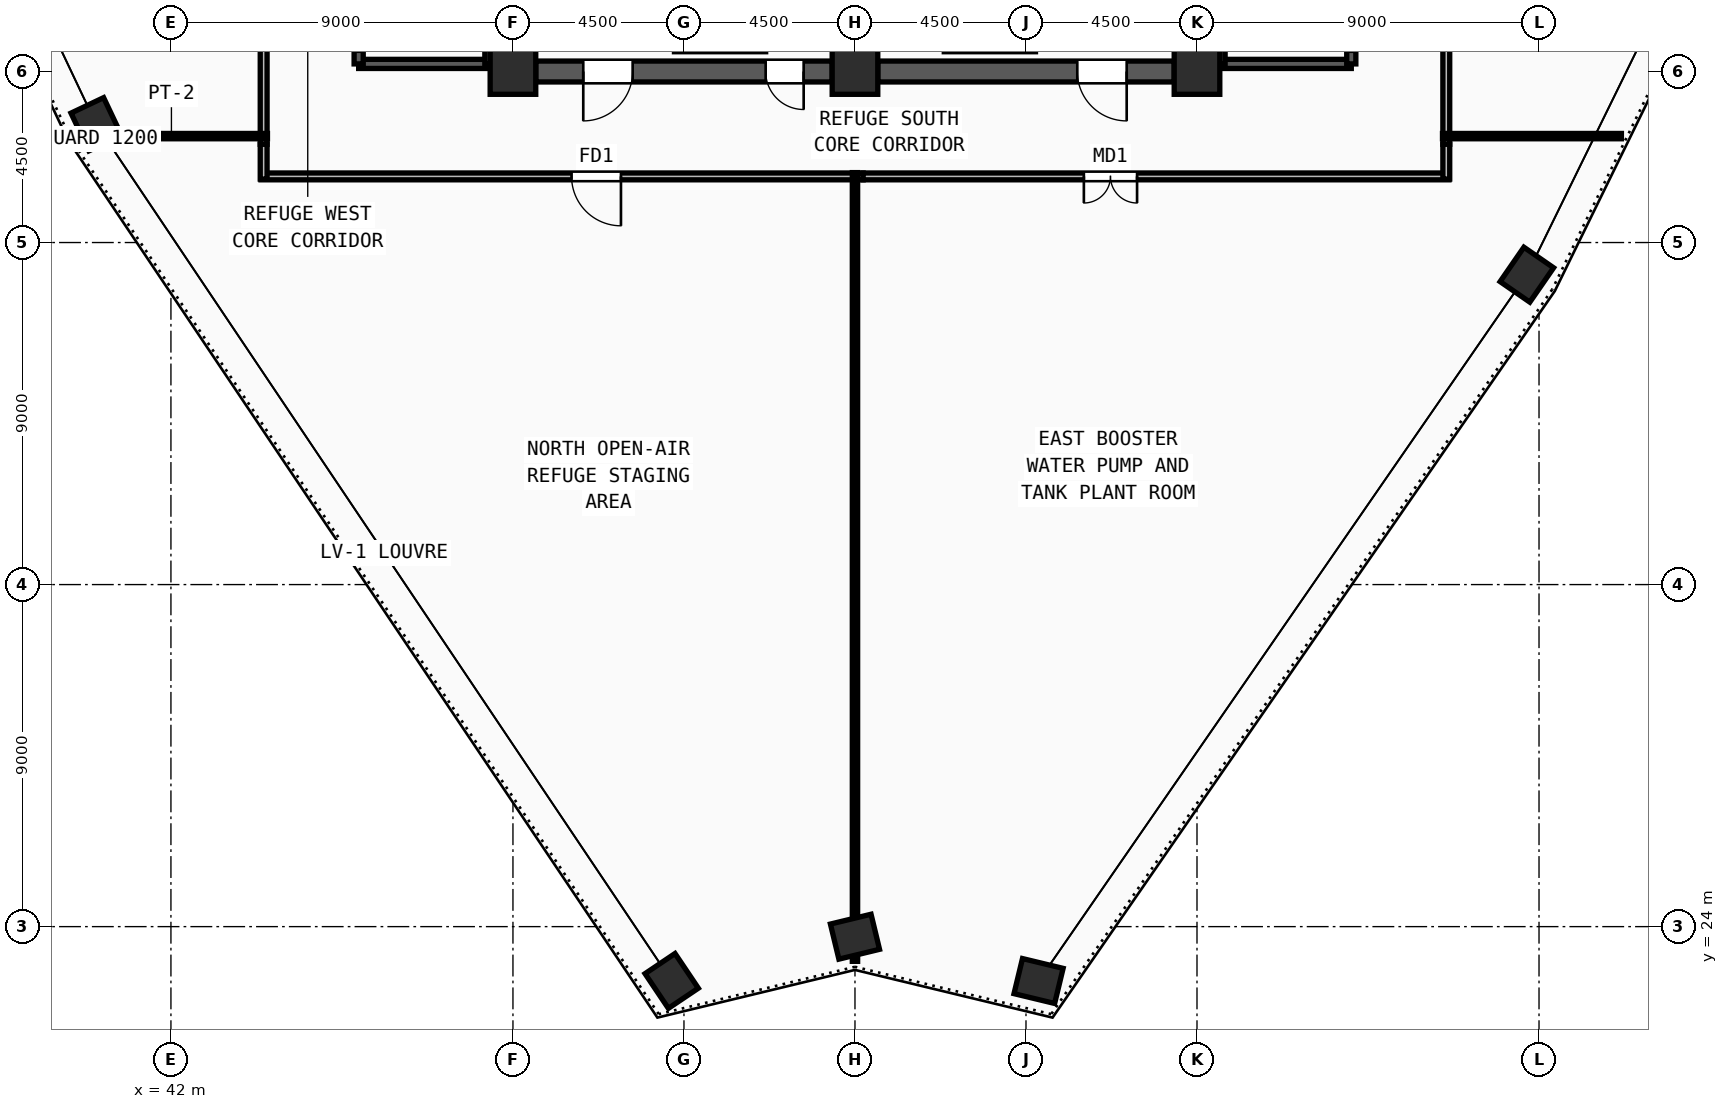
"""IFC4 building model, lengths in metres.
Left out: names, types, materials, properties, quantities, classifications, styles, units other than length and angle.
Written with IfcOpenShell. Run it as: python <this file> out.ifc"""

import sys

from ifc_helpers import new_model, si_unit, direction, frame, frame_2d, origin, origin_2d, place, context, subcontext, project, spatial, rectangle, extrude, source, transform, mapped, element, fill, save


model = new_model("IFC4")
c1 = context("Model", 3, precision=1e-05, world=origin(), true_north=direction((0.0, 1.0)))
c2 = subcontext(c1, "Body", "Model", "MODEL_VIEW")
j1 = project(units=[si_unit("LENGTHUNIT", "METRE"), si_unit("PLANEANGLEUNIT", "RADIAN")], contexts=[c1])
p1 = place(None, origin())
s1 = spatial("IfcSite", under=j1, at=p1, CompositionType="ELEMENT")
p2 = place(p1, origin())
s2 = spatial("IfcBuilding", under=s1, at=p2, CompositionType="ELEMENT")
p3 = place(p2, frame((0.0, 0.0, 324.0)))
s3 = spatial("IfcBuildingStorey", under=s2, at=p3, CompositionType="ELEMENT", Elevation=324.0)
m1 = source(origin(), c2, "Body", "SweptSolid", [
    extrude(rectangle(XDim=1.2, YDim=1.2, at=origin_2d()), origin(), (0.0, 0.0, 1.0), 4.5),
])
for number, where, z_axis, x_axis in (
    (1, (51.0, 46.5, 0.0), (0.0, 0.0, 1.0), (1.0, 0.0, 0.0)),
    (2, (60.0, 46.5, 0.0), (0.0, 0.0, 1.0), (1.0, 0.0, 0.0)),
    (3, (69.0, 46.5, 0.0), (0.0, 0.0, 1.0), (1.0, 0.0, 0.0)),
):
    element("IfcColumn", number, at=place(p3, frame(where, z_axis=z_axis, x_axis=x_axis)), inside=s3, PredefinedType="COLUMN", context=c2, shape_type="MappedRepresentation", body=[
        mapped(m1, transform((0.0, 0.0, 0.0), x_axis=(1.0, 0.0, 0.0), y_axis=(0.0, 1.0, 0.0), z_axis=(0.0, 0.0, 1.0), scale=1.0)),
    ])
m2 = source(origin(), c2, "Body", "SweptSolid", [
    extrude(rectangle(XDim=1.1, YDim=0.95, at=origin_2d()), origin(), (0.0, 0.0, 1.0), 4.5),
])
for number, where, z_axis, x_axis in (
    (4, (55.177, 22.571, 0.0), (0.0, 0.0, 1.0), (-0.558, 0.83, 0.0)),
    (5, (40.035, 45.112, 0.0), (0.0, 0.0, 1.0), (-0.428, 0.904, 0.0)),
    (6, (77.68, 41.154, 0.0), (0.0, 0.0, 1.0), (0.569, 0.823, 0.0)),
    (7, (64.831, 22.569, 0.0), (0.0, 0.0, 1.0), (-0.972, 0.235, 0.0)),
    (8, (60.0, 23.735, 0.0), (0.0, 0.0, 1.0), (0.972, 0.235, 0.0)),
):
    element("IfcColumn", number, at=place(p3, frame(where, z_axis=z_axis, x_axis=x_axis)), inside=s3, PredefinedType="COLUMN", context=c2, shape_type="MappedRepresentation", body=[
        mapped(m2, transform((0.0, 0.0, 0.0), x_axis=(1.0, 0.0, 0.0), y_axis=(0.0, 1.0, 0.0), z_axis=(0.0, 0.0, 1.0), scale=1.0)),
    ])
p4 = place(p3, frame((68.4, 46.5, 0.0), z_axis=(0.0, 0.0, 1.0), x_axis=(-1.0, 0.0, 0.0)))
e9 = element("IfcWall", 9, at=p4, inside=s3, PredefinedType="SHEAR", context=c2, shape_type="SweptSolid", body=[
    extrude(rectangle(XDim=7.8, YDim=0.55, at=frame_2d((3.9, 0.0))), origin(), (0.0, 0.0, 1.0), 4.32),
])
m3 = source(origin(), c2, "Body", "SweptSolid", [
    extrude(rectangle(XDim=1.3, YDim=2.2, at=frame_2d((0.65, 1.1))), frame((0.0, 0.285, 0.0), z_axis=(0.0, -1.0, 0.0), x_axis=(1.0, 0.0, 0.0)), (0.0, 0.0, 1.0), 0.57),
])
p5 = place(p4, frame((1.25, 0.0, 0.0)))
e10 = element("IfcOpeningElement", 10, at=p5, cuts=e9, PredefinedType="OPENING", context=c2, shape_type="MappedRepresentation", body=[
    mapped(m3, transform((0.0, 0.0, 0.0), x_axis=(1.0, 0.0, 0.0), y_axis=(0.0, 1.0, 0.0), z_axis=(0.0, 0.0, 1.0), scale=1.0)),
])
p6 = place(p3, frame((59.4, 46.5, 0.0), z_axis=(0.0, 0.0, 1.0), x_axis=(-1.0, 0.0, 0.0)))
e11 = element("IfcWall", 11, at=p6, inside=s3, PredefinedType="SHEAR", context=c2, shape_type="SweptSolid", body=[
    extrude(rectangle(XDim=7.8, YDim=0.55, at=frame_2d((3.9, 0.0))), origin(), (0.0, 0.0, 1.0), 4.32),
])
p7 = place(p6, frame((5.25, 0.0, 0.0)))
e12 = element("IfcOpeningElement", 12, at=p7, cuts=e11, PredefinedType="OPENING", context=c2, shape_type="MappedRepresentation", body=[
    mapped(m3, transform((0.0, 0.0, 0.0), x_axis=(1.0, 0.0, 0.0), y_axis=(0.0, 1.0, 0.0), z_axis=(0.0, 0.0, 1.0), scale=1.0)),
])
m4 = source(origin(), c2, "Body", "SweptSolid", [
    extrude(rectangle(XDim=1.0, YDim=2.2, at=frame_2d((0.5, 1.1))), frame((0.0, 0.285, 0.0), z_axis=(0.0, -1.0, 0.0), x_axis=(1.0, 0.0, 0.0)), (0.0, 0.0, 1.0), 0.57),
])
p8 = place(p6, frame((0.75, 0.0, 0.0)))
e13 = element("IfcOpeningElement", 13, at=p8, cuts=e11, PredefinedType="OPENING", context=c2, shape_type="MappedRepresentation", body=[
    mapped(m4, transform((0.0, 0.0, 0.0), x_axis=(1.0, 0.0, 0.0), y_axis=(0.0, 1.0, 0.0), z_axis=(0.0, 0.0, 1.0), scale=1.0)),
])
p9 = place(p3, frame((46.94, 46.7, 0.0), z_axis=(0.0, 0.0, 1.0), x_axis=(1.0, 0.0, 0.0)))
e14 = element("IfcWall", 14, at=p9, inside=s3, PredefinedType="SOLIDWALL", context=c2, shape_type="SweptSolid", body=[
    extrude(rectangle(XDim=3.44, YDim=0.24, at=frame_2d((1.72, 0.0))), origin(), (0.0, 0.0, 1.0), 4.32),
])
p10 = place(p3, frame((50.38, 46.7, 0.0), z_axis=(0.0, 0.0, 1.0), x_axis=(0.0, 1.0, 0.0)))
e15 = element("IfcWall", 15, at=p10, inside=s3, PredefinedType="SOLIDWALL", context=c2, shape_type="SweptSolid", body=[
    extrude(rectangle(XDim=7.82, YDim=0.24, at=frame_2d((3.91, 0.0))), origin(), (0.0, 0.0, 1.0), 4.32),
])
p11 = place(p3, frame((46.94, 54.52, 0.0), z_axis=(0.0, 0.0, 1.0), x_axis=(0.0, -1.0, 0.0)))
e16 = element("IfcWall", 16, at=p11, inside=s3, PredefinedType="SOLIDWALL", context=c2, shape_type="SweptSolid", body=[
    extrude(rectangle(XDim=7.82, YDim=0.24, at=frame_2d((3.91, 0.0))), origin(), (0.0, 0.0, 1.0), 4.32),
])
m5 = source(origin(), c2, "Body", "SweptSolid", [
    extrude(rectangle(XDim=1.2, YDim=2.2, at=frame_2d((0.6, 1.1))), frame((0.0, 0.13, 0.0), z_axis=(0.0, -1.0, 0.0), x_axis=(1.0, 0.0, 0.0)), (0.0, 0.0, 1.0), 0.26),
])
p12 = place(p11, frame((6.3, 0.0, 0.0)))
e17 = element("IfcOpeningElement", 17, at=p12, cuts=e16, PredefinedType="OPENING", context=c2, shape_type="MappedRepresentation", body=[
    mapped(m5, transform((0.0, 0.0, 0.0), x_axis=(1.0, 0.0, 0.0), y_axis=(0.0, 1.0, 0.0), z_axis=(0.0, 0.0, 1.0), scale=1.0)),
])
p13 = place(p3, frame((69.62, 46.7, 0.0), z_axis=(0.0, 0.0, 1.0), x_axis=(1.0, 0.0, 0.0)))
e18 = element("IfcWall", 18, at=p13, inside=s3, PredefinedType="SOLIDWALL", context=c2, shape_type="SweptSolid", body=[
    extrude(rectangle(XDim=3.44, YDim=0.24, at=frame_2d((1.72, 0.0))), origin(), (0.0, 0.0, 1.0), 4.32),
])
p14 = place(p3, frame((73.06, 46.7, 0.0), z_axis=(0.0, 0.0, 1.0), x_axis=(0.0, 1.0, 0.0)))
e19 = element("IfcWall", 19, at=p14, inside=s3, PredefinedType="SOLIDWALL", context=c2, shape_type="SweptSolid", body=[
    extrude(rectangle(XDim=7.82, YDim=0.24, at=frame_2d((3.91, 0.0))), origin(), (0.0, 0.0, 1.0), 4.32),
])
p15 = place(p14, frame((0.32, 0.0, 0.0)))
e20 = element("IfcOpeningElement", 20, at=p15, cuts=e19, PredefinedType="OPENING", context=c2, shape_type="MappedRepresentation", body=[
    mapped(m5, transform((0.0, 0.0, 0.0), x_axis=(1.0, 0.0, 0.0), y_axis=(0.0, 1.0, 0.0), z_axis=(0.0, 0.0, 1.0), scale=1.0)),
])
p16 = place(p3, frame((69.62, 54.52, 0.0), z_axis=(0.0, 0.0, 1.0), x_axis=(0.0, -1.0, 0.0)))
e21 = element("IfcWall", 21, at=p16, inside=s3, PredefinedType="SOLIDWALL", context=c2, shape_type="SweptSolid", body=[
    extrude(rectangle(XDim=7.82, YDim=0.24, at=frame_2d((3.91, 0.0))), origin(), (0.0, 0.0, 1.0), 4.32),
])
p17 = place(p3, frame((75.56, 67.015, 0.0), z_axis=(0.0, 0.0, 1.0), x_axis=(0.0, -1.0, 0.0)))
e22 = element("IfcWall", 22, at=p17, inside=s3, PredefinedType="PARTITIONING", context=c2, shape_type="SweptSolid", body=[
    extrude(rectangle(XDim=22.43, YDim=0.18, at=frame_2d((11.215, 0.0))), origin(), (0.0, 0.0, 1.0), 4.32),
])
m6 = source(origin(), c2, "Body", "SweptSolid", [
    extrude(rectangle(XDim=1.3, YDim=2.2, at=frame_2d((0.65, 1.1))), frame((0.0, 0.1, 0.0), z_axis=(0.0, -1.0, 0.0), x_axis=(1.0, 0.0, 0.0)), (0.0, 0.0, 1.0), 0.2),
])
p18 = place(p17, frame((10.565, 0.0, 0.0)))
e23 = element("IfcOpeningElement", 23, at=p18, cuts=e22, PredefinedType="OPENING", context=c2, shape_type="MappedRepresentation", body=[
    mapped(m6, transform((0.0, 0.0, 0.0), x_axis=(1.0, 0.0, 0.0), y_axis=(0.0, 1.0, 0.0), z_axis=(0.0, 0.0, 1.0), scale=1.0)),
])
p19 = place(p3, frame((60.215, 43.74, 0.0), z_axis=(0.0, 0.0, 1.0), x_axis=(-1.0, 0.0, 0.0)))
e24 = element("IfcWall", 24, at=p19, inside=s3, PredefinedType="PARTITIONING", context=c2, shape_type="SweptSolid", body=[
    extrude(rectangle(XDim=15.845, YDim=0.18, at=frame_2d((7.922, 0.0))), origin(), (0.0, 0.0, 1.0), 4.32),
])
p20 = place(p19, frame((6.373, 0.0, 0.0)))
e25 = element("IfcOpeningElement", 25, at=p20, cuts=e24, PredefinedType="OPENING", context=c2, shape_type="MappedRepresentation", body=[
    mapped(m6, transform((0.0, 0.0, 0.0), x_axis=(1.0, 0.0, 0.0), y_axis=(0.0, 1.0, 0.0), z_axis=(0.0, 0.0, 1.0), scale=1.0)),
])
p21 = place(p3, frame((75.63, 43.74, 0.0), z_axis=(0.0, 0.0, 1.0), x_axis=(-1.0, 0.0, 0.0)))
e26 = element("IfcWall", 26, at=p21, inside=s3, PredefinedType="PARTITIONING", context=c2, shape_type="SweptSolid", body=[
    extrude(rectangle(XDim=15.415, YDim=0.18, at=frame_2d((7.708, 0.0))), origin(), (0.0, 0.0, 1.0), 4.32),
])
m7 = source(origin(), c2, "Body", "SweptSolid", [
    extrude(rectangle(XDim=1.4, YDim=2.25, at=frame_2d((0.7, 1.125))), frame((0.0, 0.1, 0.0), z_axis=(0.0, -1.0, 0.0), x_axis=(1.0, 0.0, 0.0)), (0.0, 0.0, 1.0), 0.2),
])
p22 = place(p21, frame((8.207, 0.0, 0.0)))
e27 = element("IfcOpeningElement", 27, at=p22, cuts=e26, PredefinedType="OPENING", context=c2, shape_type="MappedRepresentation", body=[
    mapped(m7, transform((0.0, 0.0, 0.0), x_axis=(1.0, 0.0, 0.0), y_axis=(0.0, 1.0, 0.0), z_axis=(0.0, 0.0, 1.0), scale=1.0)),
])
p23 = place(p3, frame((44.44, 44.585, 0.0), z_axis=(0.0, 0.0, 1.0), x_axis=(0.0, 1.0, 0.0)))
e28 = element("IfcWall", 28, at=p23, inside=s3, PredefinedType="PARTITIONING", context=c2, shape_type="SweptSolid", body=[
    extrude(rectangle(XDim=2.755, YDim=0.18, at=frame_2d((1.377, 0.0))), origin(), (0.0, 0.0, 1.0), 4.32),
])
for number, where, z_axis, x_axis in (
    (29, (44.44, 43.67, 0.0), (0.0, 0.0, 1.0), (0.0, 1.0, 0.0)),
    (30, (75.56, 44.585, 0.0), (0.0, 0.0, 1.0), (0.0, -1.0, 0.0)),
):
    element("IfcWall", number, at=place(p3, frame(where, z_axis=z_axis, x_axis=x_axis)), inside=s3, PredefinedType="PARTITIONING", context=c2, shape_type="SweptSolid", body=[
        extrude(rectangle(XDim=0.915, YDim=0.18, at=frame_2d((0.458, 0.0))), origin(), (0.0, 0.0, 1.0), 4.32),
    ])
p24 = place(p3, frame((44.54, 44.8, 0.0), z_axis=(0.0, 0.0, 1.0), x_axis=(-1.0, 0.0, 0.0)))
e31 = element("IfcWall", 31, at=p24, inside=s3, PredefinedType="PARTITIONING", context=c2, shape_type="SweptSolid", body=[
    extrude(rectangle(XDim=5.054, YDim=0.14, at=frame_2d((2.527, 0.0))), origin(), (0.0, 0.0, 1.0), 4.32),
])
p25 = place(p3, frame((75.46, 44.8, 0.0), z_axis=(0.0, 0.0, 1.0), x_axis=(1.0, 0.0, 0.0)))
e32 = element("IfcWall", 32, at=p25, inside=s3, PredefinedType="PARTITIONING", context=c2, shape_type="SweptSolid", body=[
    extrude(rectangle(XDim=4.708, YDim=0.14, at=frame_2d((2.354, 0.0))), origin(), (0.0, 0.0, 1.0), 4.32),
])
p26 = place(p3, frame((60.0, 43.84, 0.0), z_axis=(0.0, 0.0, 1.0), x_axis=(0.0, -1.0, 0.0)))
e33 = element("IfcWall", 33, at=p26, inside=s3, PredefinedType="PARTITIONING", context=c2, shape_type="SweptSolid", body=[
    extrude(rectangle(XDim=20.753, YDim=0.14, at=frame_2d((10.376, 0.0))), origin(), (0.0, 0.0, 1.0), 4.32),
])
m8 = source(origin(), c2, "Body", "SweptSolid", [
    extrude(rectangle(XDim=1.3, YDim=2.2, at=frame_2d((0.65, 1.1))), frame((0.0, 0.025, 0.0), z_axis=(0.0, -1.0, 0.0), x_axis=(1.0, 0.0, 0.0)), (0.0, 0.0, 1.0), 0.05),
])
p27 = place(p7, origin())
e34 = element("IfcDoor", 34, at=p27, inside=s3, OperationType="SINGLE_SWING_RIGHT", PredefinedType="DOOR", context=c2, shape_type="MappedRepresentation", body=[
    mapped(m8, transform((0.0, 0.0, 0.0), x_axis=(1.0, 0.0, 0.0), y_axis=(0.0, 1.0, 0.0), z_axis=(0.0, 0.0, 1.0), scale=1.0)),
])
fill(e12, e34)
m9 = source(origin(), c2, "Body", "SweptSolid", [
    extrude(rectangle(XDim=1.0, YDim=2.2, at=frame_2d((0.5, 1.1))), frame((0.0, 0.025, 0.0), z_axis=(0.0, -1.0, 0.0), x_axis=(1.0, 0.0, 0.0)), (0.0, 0.0, 1.0), 0.05),
])
p28 = place(p8, origin())
e35 = element("IfcDoor", 35, at=p28, inside=s3, OperationType="SINGLE_SWING_LEFT", PredefinedType="DOOR", context=c2, shape_type="MappedRepresentation", body=[
    mapped(m9, transform((0.0, 0.0, 0.0), x_axis=(1.0, 0.0, 0.0), y_axis=(0.0, 1.0, 0.0), z_axis=(0.0, 0.0, 1.0), scale=1.0)),
])
fill(e13, e35)
p29 = place(p5, origin())
e36 = element("IfcDoor", 36, at=p29, inside=s3, OperationType="SINGLE_SWING_LEFT", PredefinedType="DOOR", context=c2, shape_type="MappedRepresentation", body=[
    mapped(m8, transform((0.0, 0.0, 0.0), x_axis=(1.0, 0.0, 0.0), y_axis=(0.0, 1.0, 0.0), z_axis=(0.0, 0.0, 1.0), scale=1.0)),
])
fill(e10, e36)
p30 = place(p20, origin())
e37 = element("IfcDoor", 37, at=p30, inside=s3, OperationType="SINGLE_SWING_LEFT", PredefinedType="DOOR", context=c2, shape_type="MappedRepresentation", body=[
    mapped(m8, transform((0.0, 0.0, 0.0), x_axis=(1.0, 0.0, 0.0), y_axis=(0.0, 1.0, 0.0), z_axis=(0.0, 0.0, 1.0), scale=1.0)),
])
fill(e25, e37)
m10 = source(origin(), c2, "Body", "SweptSolid", [
    extrude(rectangle(XDim=1.4, YDim=2.25, at=frame_2d((0.7, 1.125))), frame((0.0, 0.025, 0.0), z_axis=(0.0, -1.0, 0.0), x_axis=(1.0, 0.0, 0.0)), (0.0, 0.0, 1.0), 0.05),
])
p31 = place(p22, origin())
e38 = element("IfcDoor", 38, at=p31, inside=s3, OperationType="DOUBLE_DOOR_SINGLE_SWING", PredefinedType="DOOR", context=c2, shape_type="MappedRepresentation", body=[
    mapped(m10, transform((0.0, 0.0, 0.0), x_axis=(1.0, 0.0, 0.0), y_axis=(0.0, 1.0, 0.0), z_axis=(0.0, 0.0, 1.0), scale=1.0)),
])
fill(e27, e38)
save(model, sys.argv[1])
